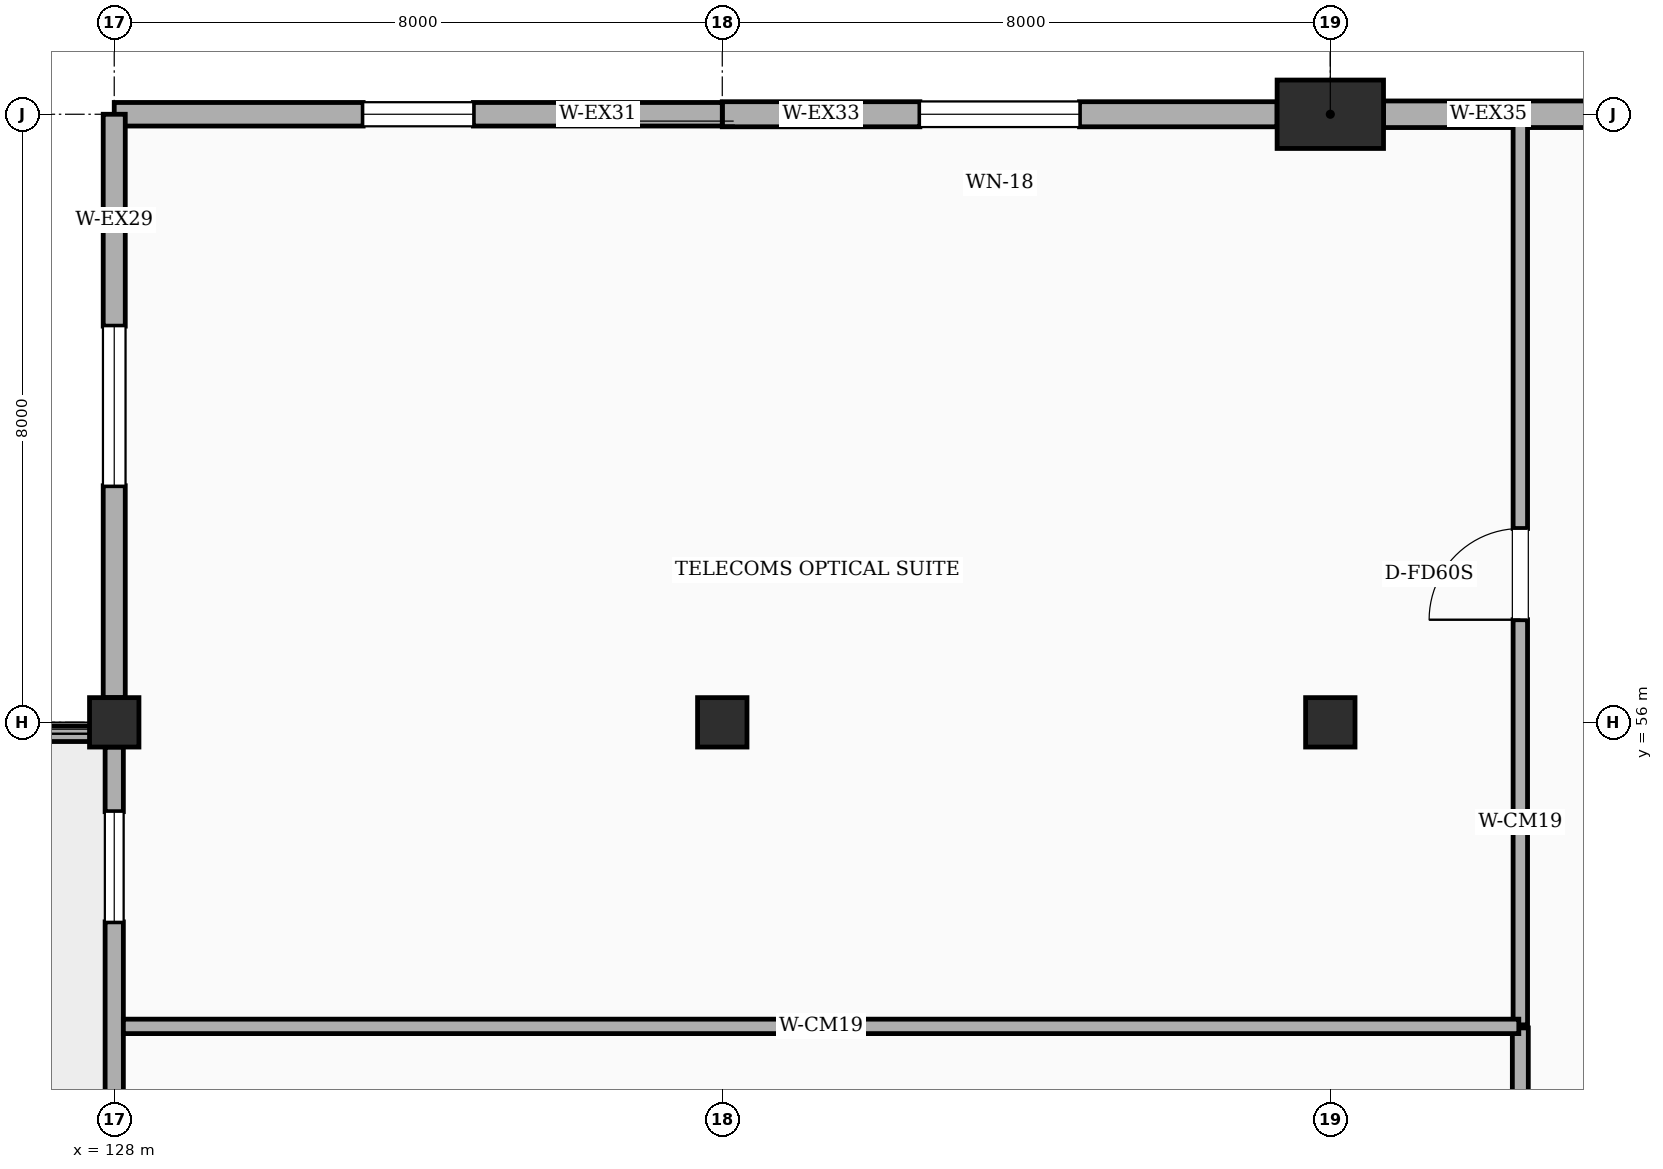
"""IFC4 building model, lengths in metres.
Left out: names, types, materials, properties, quantities, classifications, styles, units other than length and angle.
Written with IfcOpenShell. Run it as: python <this file> out.ifc"""

import sys

from ifc_helpers import new_model, si_unit, direction, frame, frame_2d, origin, origin_2d, place, context, subcontext, project, spatial, rectangle, extrude, element, fill, save


model = new_model("IFC4")
c1 = context("Model", 3, precision=1e-05, world=origin(), true_north=direction((0.0, 1.0)))
c2 = subcontext(c1, "Body", "Model", "MODEL_VIEW")
j1 = project(units=[si_unit("LENGTHUNIT", "METRE"), si_unit("PLANEANGLEUNIT", "RADIAN")], contexts=[c1])
p1 = place(None, origin())
s1 = spatial("IfcSite", under=j1, at=p1, CompositionType="ELEMENT")
p2 = place(p1, origin())
s2 = spatial("IfcBuilding", under=s1, at=p2, CompositionType="ELEMENT")
p3 = place(p2, frame((0.0, 0.0, 15.0)))
s3 = spatial("IfcBuildingStorey", under=s2, at=p3, CompositionType="ELEMENT", Elevation=15.0)
p4 = place(p3, frame((144.0, 64.0, 0.0), z_axis=(0.0, 0.0, 1.0), x_axis=(1.0, 0.0, 0.0)))
e1 = element("IfcColumn", 1, at=p4, inside=s3, PredefinedType="COLUMN", context=c2, shape_type="SweptSolid", body=[
    extrude(rectangle(XDim=1.4, YDim=0.9, at=origin_2d()), origin(), (0.0, 0.0, 1.0), 4.2),
])
for number, where, z_axis, x_axis in (
    (2, (128.0, 56.0, 0.0), (0.0, 0.0, 1.0), (1.0, 0.0, 0.0)),
    (3, (136.0, 56.0, 0.0), (0.0, 0.0, 1.0), (1.0, 0.0, 0.0)),
    (4, (144.0, 56.0, 0.0), (0.0, 0.0, 1.0), (1.0, 0.0, 0.0)),
):
    element("IfcColumn", number, at=place(p3, frame(where, z_axis=z_axis, x_axis=x_axis)), inside=s3, PredefinedType="COLUMN", context=c2, shape_type="SweptSolid", body=[
        extrude(rectangle(XDim=0.65, YDim=0.65, at=origin_2d()), origin(), (0.0, 0.0, 1.0), 4.2),
    ])
p5 = place(p3, frame((151.675, 64.0, 0.0), z_axis=(0.0, 0.0, 1.0), x_axis=(-1.0, 0.0, 0.0)))
e5 = element("IfcWall", 5, at=p5, inside=s3, PredefinedType="STANDARD", context=c2, shape_type="SweptSolid", body=[
    extrude(rectangle(XDim=6.975, YDim=0.35, at=frame_2d((3.488, 0.0))), origin(), (0.0, 0.0, 1.0), 3.95),
])
p6 = place(p5, frame((2.762, 0.0, 1.15)))
e6 = element("IfcOpeningElement", 6, at=p6, cuts=e5, PredefinedType="OPENING", context=c2, shape_type="SweptSolid", body=[
    extrude(rectangle(XDim=1.45, YDim=1.4, at=frame_2d((0.725, 0.7))), frame((0.0, 0.185, 0.0), z_axis=(0.0, -1.0, 0.0), x_axis=(1.0, 0.0, 0.0)), (0.0, 0.0, 1.0), 0.37),
])
p7 = place(p3, frame((143.3, 64.0, 0.0), z_axis=(0.0, 0.0, 1.0), x_axis=(-1.0, 0.0, 0.0)))
e7 = element("IfcWall", 7, at=p7, inside=s3, PredefinedType="STANDARD", context=c2, shape_type="SweptSolid", body=[
    extrude(rectangle(XDim=7.3, YDim=0.33, at=frame_2d((3.65, 0.0))), origin(), (0.0, 0.0, 1.0), 3.95),
])
p8 = place(p7, frame((2.6, 0.0, 1.15)))
e8 = element("IfcOpeningElement", 8, at=p8, cuts=e7, PredefinedType="OPENING", context=c2, shape_type="SweptSolid", body=[
    extrude(rectangle(XDim=2.1, YDim=1.4, at=frame_2d((1.05, 0.7))), frame((0.0, 0.175, 0.0), z_axis=(0.0, -1.0, 0.0), x_axis=(1.0, 0.0, 0.0)), (0.0, 0.0, 1.0), 0.35),
])
p9 = place(p3, frame((136.0, 64.0, 0.0), z_axis=(0.0, 0.0, 1.0), x_axis=(-1.0, 0.0, 0.0)))
e9 = element("IfcWall", 9, at=p9, inside=s3, PredefinedType="STANDARD", context=c2, shape_type="SweptSolid", body=[
    extrude(rectangle(XDim=8.0, YDim=0.31, at=frame_2d((4.0, 0.0))), origin(), (0.0, 0.0, 1.0), 3.95),
])
p10 = place(p9, frame((3.275, 0.0, 1.15)))
e10 = element("IfcOpeningElement", 10, at=p10, cuts=e9, PredefinedType="OPENING", context=c2, shape_type="SweptSolid", body=[
    extrude(rectangle(XDim=1.45, YDim=1.4, at=frame_2d((0.725, 0.7))), frame((0.0, 0.165, 0.0), z_axis=(0.0, -1.0, 0.0), x_axis=(1.0, 0.0, 0.0)), (0.0, 0.0, 1.0), 0.33),
])
p11 = place(p3, frame((128.0, 64.0, 0.0), z_axis=(0.0, 0.0, 1.0), x_axis=(0.0, -1.0, 0.0)))
e11 = element("IfcWall", 11, at=p11, inside=s3, PredefinedType="STANDARD", context=c2, shape_type="SweptSolid", body=[
    extrude(rectangle(XDim=7.675, YDim=0.29, at=frame_2d((3.837, 0.0))), origin(), (0.0, 0.0, 1.0), 3.95),
])
p12 = place(p11, frame((2.788, 0.0, 1.15)))
e12 = element("IfcOpeningElement", 12, at=p12, cuts=e11, PredefinedType="OPENING", context=c2, shape_type="SweptSolid", body=[
    extrude(rectangle(XDim=2.1, YDim=1.4, at=frame_2d((1.05, 0.7))), frame((0.0, 0.155, 0.0), z_axis=(0.0, -1.0, 0.0), x_axis=(1.0, 0.0, 0.0)), (0.0, 0.0, 1.0), 0.31),
])
p13 = place(p3, frame((128.0, 55.675, 0.0), z_axis=(0.0, 0.0, 1.0), x_axis=(0.0, -1.0, 0.0)))
e13 = element("IfcWall", 13, at=p13, inside=s3, PredefinedType="SOLIDWALL", context=c2, shape_type="SweptSolid", body=[
    extrude(rectangle(XDim=7.35, YDim=0.24, at=frame_2d((3.675, 0.0))), origin(), (0.0, 0.0, 1.0), 3.36),
])
p14 = place(p13, frame((0.85, 0.0, 1.15)))
e14 = element("IfcOpeningElement", 14, at=p14, cuts=e13, PredefinedType="OPENING", context=c2, shape_type="SweptSolid", body=[
    extrude(rectangle(XDim=1.45, YDim=1.4, at=frame_2d((0.725, 0.7))), frame((0.0, 0.13, 0.0), z_axis=(0.0, -1.0, 0.0), x_axis=(1.0, 0.0, 0.0)), (0.0, 0.0, 1.0), 0.26),
])
p15 = place(p3, frame((124.31, 55.85, 0.0), z_axis=(0.0, 0.0, 1.0), x_axis=(1.0, 0.0, 0.0)))
e15 = element("IfcWall", 15, at=p15, inside=s3, PredefinedType="PARAPET", context=c2, shape_type="SweptSolid", body=[
    extrude(rectangle(XDim=3.38, YDim=0.205, at=frame_2d((1.69, 0.0))), origin(), (0.0, 0.0, 1.0), 0.42),
])
p16 = place(p3, frame((146.5, 34.02, 0.0), z_axis=(0.0, 0.0, 1.0), x_axis=(0.0, 1.0, 0.0)))
e16 = element("IfcWall", 16, at=p16, inside=s3, PredefinedType="SOLIDWALL", context=c2, shape_type="SweptSolid", body=[
    extrude(rectangle(XDim=17.96, YDim=0.21, at=frame_2d((8.98, 0.0))), origin(), (0.0, 0.0, 1.0), 3.95),
])
p17 = place(p16, frame((8.38, 0.0, 0.0)))
e17 = element("IfcOpeningElement", 17, at=p17, cuts=e16, PredefinedType="OPENING", context=c2, shape_type="SweptSolid", body=[
    extrude(rectangle(XDim=1.2, YDim=2.15, at=frame_2d((0.6, 1.075))), frame((0.0, 0.115, 0.0), z_axis=(0.0, -1.0, 0.0), x_axis=(1.0, 0.0, 0.0)), (0.0, 0.0, 1.0), 0.23),
])
p18 = place(p3, frame((146.5, 52.02, 0.0), z_axis=(0.0, 0.0, 1.0), x_axis=(0.0, 1.0, 0.0)))
e18 = element("IfcWall", 18, at=p18, inside=s3, PredefinedType="SOLIDWALL", context=c2, shape_type="SweptSolid", body=[
    extrude(rectangle(XDim=11.86, YDim=0.19, at=frame_2d((5.93, 0.0))), origin(), (0.0, 0.0, 1.0), 3.95),
])
p19 = place(p18, frame((5.33, 0.0, 0.0)))
e19 = element("IfcOpeningElement", 19, at=p19, cuts=e18, PredefinedType="OPENING", context=c2, shape_type="SweptSolid", body=[
    extrude(rectangle(XDim=1.2, YDim=2.15, at=frame_2d((0.6, 1.075))), frame((0.0, 0.105, 0.0), z_axis=(0.0, -1.0, 0.0), x_axis=(1.0, 0.0, 0.0)), (0.0, 0.0, 1.0), 0.21),
])
p20 = place(p3, frame((128.12, 52.0, 0.0), z_axis=(0.0, 0.0, 1.0), x_axis=(1.0, 0.0, 0.0)))
e20 = element("IfcWall", 20, at=p20, inside=s3, PredefinedType="SOLIDWALL", context=c2, shape_type="SweptSolid", body=[
    extrude(rectangle(XDim=18.36, YDim=0.19, at=frame_2d((9.18, 0.0))), origin(), (0.0, 0.0, 1.0), 3.31),
])
p21 = place(p8, origin())
e21 = element("IfcWindow", 21, at=p21, inside=s3, PartitioningType="SINGLE_PANEL", PredefinedType="WINDOW", context=c2, shape_type="SweptSolid", body=[
    extrude(rectangle(XDim=2.1, YDim=1.4, at=frame_2d((1.05, 0.7))), frame((0.0, 0.03, 0.0), z_axis=(0.0, -1.0, 0.0), x_axis=(1.0, 0.0, 0.0)), (0.0, 0.0, 1.0), 0.06),
])
fill(e8, e21)
p22 = place(p10, origin())
e22 = element("IfcWindow", 22, at=p22, inside=s3, PartitioningType="SINGLE_PANEL", PredefinedType="WINDOW", context=c2, shape_type="SweptSolid", body=[
    extrude(rectangle(XDim=1.45, YDim=1.4, at=frame_2d((0.725, 0.7))), frame((0.0, 0.03, 0.0), z_axis=(0.0, -1.0, 0.0), x_axis=(1.0, 0.0, 0.0)), (0.0, 0.0, 1.0), 0.06),
])
fill(e10, e22)
p23 = place(p12, origin())
e23 = element("IfcWindow", 23, at=p23, inside=s3, PartitioningType="SINGLE_PANEL", PredefinedType="WINDOW", context=c2, shape_type="SweptSolid", body=[
    extrude(rectangle(XDim=2.1, YDim=1.4, at=frame_2d((1.05, 0.7))), frame((0.0, 0.03, 0.0), z_axis=(0.0, -1.0, 0.0), x_axis=(1.0, 0.0, 0.0)), (0.0, 0.0, 1.0), 0.06),
])
fill(e12, e23)
p24 = place(p14, origin())
e24 = element("IfcWindow", 24, at=p24, inside=s3, PartitioningType="SINGLE_PANEL", PredefinedType="WINDOW", context=c2, shape_type="SweptSolid", body=[
    extrude(rectangle(XDim=1.45, YDim=1.4, at=frame_2d((0.725, 0.7))), frame((0.0, 0.03, 0.0), z_axis=(0.0, -1.0, 0.0), x_axis=(1.0, 0.0, 0.0)), (0.0, 0.0, 1.0), 0.06),
])
fill(e14, e24)
p25 = place(p19, origin())
e25 = element("IfcDoor", 25, at=p25, inside=s3, OperationType="SINGLE_SWING_LEFT", PredefinedType="DOOR", context=c2, shape_type="SweptSolid", body=[
    extrude(rectangle(XDim=1.2, YDim=2.15, at=frame_2d((0.6, 1.075))), frame((0.0, 0.025, 0.0), z_axis=(0.0, -1.0, 0.0), x_axis=(1.0, 0.0, 0.0)), (0.0, 0.0, 1.0), 0.05),
])
fill(e19, e25)
save(model, sys.argv[1])
